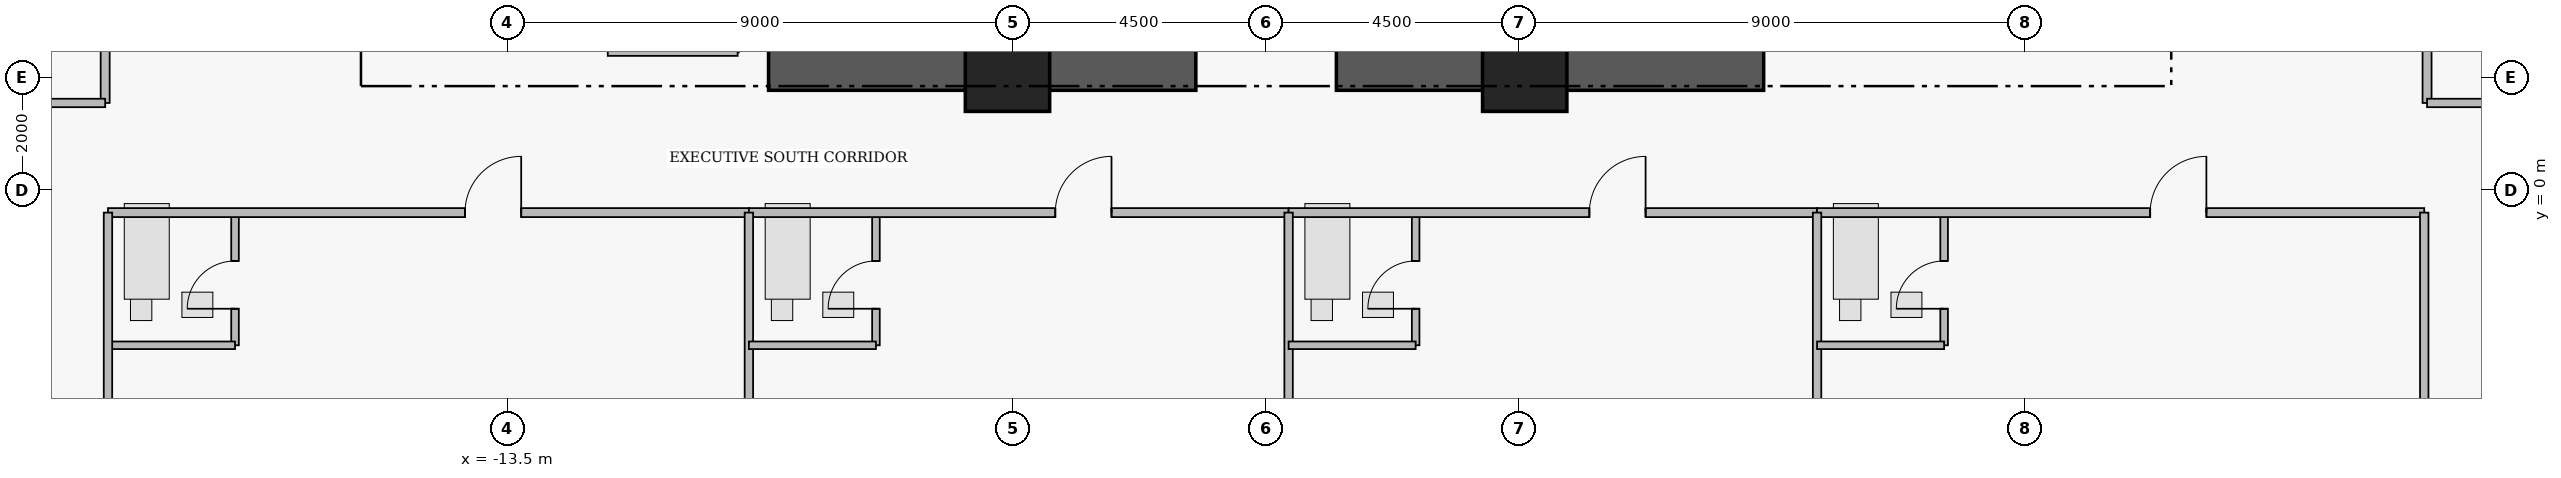
"""IFC4 building model, lengths in metres.
Left out: names, types, materials, properties, quantities, classifications, styles, units other than length and angle.
Written with IfcOpenShell. Run it as: python <this file> out.ifc"""

import sys

from ifc_helpers import new_model, si_unit, direction, frame, frame_2d, origin, origin_2d, place, context, subcontext, project, spatial, rectangle, extrude, element, fill, save


model = new_model("IFC4")
c1 = context("Model", 3, precision=1e-05, world=origin(), true_north=direction((0.0, 1.0)))
c2 = subcontext(c1, "Body", "Model", "MODEL_VIEW")
j1 = project(units=[si_unit("LENGTHUNIT", "METRE"), si_unit("PLANEANGLEUNIT", "RADIAN")], contexts=[c1])
p1 = place(None, origin())
s1 = spatial("IfcSite", under=j1, at=p1, CompositionType="ELEMENT")
p2 = place(p1, origin())
s2 = spatial("IfcBuilding", under=s1, at=p2, CompositionType="ELEMENT")
p3 = place(p2, frame((0.0, 0.0, 117.55)))
s3 = spatial("IfcBuildingStorey", under=s2, at=p3, CompositionType="ELEMENT", Elevation=117.55)
for number, where, z_axis, x_axis in (
    (1, (-8.85, 2.15, 0.0), (0.0, 0.0, 1.0), (1.0, 0.0, 0.0)),
    (2, (1.25, 2.15, 0.0), (0.0, 0.0, 1.0), (1.0, 0.0, 0.0)),
):
    element("IfcWall", number, at=place(p3, frame(where, z_axis=z_axis, x_axis=x_axis)), inside=s3, PredefinedType="SHEAR", context=c2, shape_type="SweptSolid", body=[
        extrude(rectangle(XDim=7.6, YDim=0.75, at=frame_2d((3.8, 0.0))), origin(), (0.0, 0.0, 1.0), 3.43),
    ])
for number, where, z_axis, x_axis in (
    (3, (-4.6, 2.15, 0.0), (0.0, 0.0, 1.0), (1.0, 0.0, 0.0)),
    (4, (4.6, 2.15, 0.0), (0.0, 0.0, 1.0), (1.0, 0.0, 0.0)),
):
    element("IfcColumn", number, at=place(p3, frame(where, z_axis=z_axis, x_axis=x_axis)), inside=s3, PredefinedType="COLUMN", context=c2, shape_type="SweptSolid", body=[
        extrude(rectangle(XDim=1.5, YDim=1.5, at=origin_2d()), origin(), (0.0, 0.0, 1.0), 3.65),
    ])
p4 = place(p3, frame((-18.34, -2.76, 0.0), z_axis=(0.0, 0.0, 1.0), x_axis=(0.0, 1.0, 0.0)))
e5 = element("IfcWall", 5, at=p4, inside=s3, PredefinedType="PLUMBINGWALL", context=c2, shape_type="SweptSolid", body=[
    extrude(rectangle(XDim=2.36, YDim=0.135, at=frame_2d((1.18, 0.0))), origin(), (0.0, 0.0, 1.0), 3.43),
])
p5 = place(p4, frame((0.65, 0.0, 0.0)))
e6 = element("IfcOpeningElement", 6, at=p5, cuts=e5, PredefinedType="OPENING", context=c2, shape_type="SweptSolid", body=[
    extrude(rectangle(XDim=0.85, YDim=2.1, at=frame_2d((0.425, 1.05))), frame((0.0, 0.077, 0.0), z_axis=(0.0, -1.0, 0.0), x_axis=(1.0, 0.0, 0.0)), (0.0, 0.0, 1.0), 0.155),
])
p6 = place(p3, frame((-20.6, -0.4, 0.0), z_axis=(0.0, 0.0, 1.0), x_axis=(1.0, 0.0, 0.0)))
e7 = element("IfcWall", 7, at=p6, inside=s3, PredefinedType="PARTITIONING", context=c2, shape_type="SweptSolid", body=[
    extrude(rectangle(XDim=11.4, YDim=0.16, at=frame_2d((5.7, 0.0))), origin(), (0.0, 0.0, 1.0), 3.43),
])
p7 = place(p6, frame((6.35, 0.0, 0.0)))
e8 = element("IfcOpeningElement", 8, at=p7, cuts=e7, PredefinedType="OPENING", context=c2, shape_type="SweptSolid", body=[
    extrude(rectangle(XDim=1.0, YDim=2.15, at=frame_2d((0.5, 1.075))), frame((0.0, 0.09, 0.0), z_axis=(0.0, -1.0, 0.0), x_axis=(1.0, 0.0, 0.0)), (0.0, 0.0, 1.0), 0.18),
])
p8 = place(p3, frame((-6.94, -2.76, 0.0), z_axis=(0.0, 0.0, 1.0), x_axis=(0.0, 1.0, 0.0)))
e9 = element("IfcWall", 9, at=p8, inside=s3, PredefinedType="PLUMBINGWALL", context=c2, shape_type="SweptSolid", body=[
    extrude(rectangle(XDim=2.36, YDim=0.135, at=frame_2d((1.18, 0.0))), origin(), (0.0, 0.0, 1.0), 3.43),
])
p9 = place(p8, frame((0.65, 0.0, 0.0)))
e10 = element("IfcOpeningElement", 10, at=p9, cuts=e9, PredefinedType="OPENING", context=c2, shape_type="SweptSolid", body=[
    extrude(rectangle(XDim=0.85, YDim=2.1, at=frame_2d((0.425, 1.05))), frame((0.0, 0.077, 0.0), z_axis=(0.0, -1.0, 0.0), x_axis=(1.0, 0.0, 0.0)), (0.0, 0.0, 1.0), 0.155),
])
p10 = place(p3, frame((-9.2, -0.4, 0.0), z_axis=(0.0, 0.0, 1.0), x_axis=(1.0, 0.0, 0.0)))
e11 = element("IfcWall", 11, at=p10, inside=s3, PredefinedType="PARTITIONING", context=c2, shape_type="SweptSolid", body=[
    extrude(rectangle(XDim=9.6, YDim=0.16, at=frame_2d((4.8, 0.0))), origin(), (0.0, 0.0, 1.0), 3.43),
])
p11 = place(p10, frame((5.45, 0.0, 0.0)))
e12 = element("IfcOpeningElement", 12, at=p11, cuts=e11, PredefinedType="OPENING", context=c2, shape_type="SweptSolid", body=[
    extrude(rectangle(XDim=1.0, YDim=2.15, at=frame_2d((0.5, 1.075))), frame((0.0, 0.09, 0.0), z_axis=(0.0, -1.0, 0.0), x_axis=(1.0, 0.0, 0.0)), (0.0, 0.0, 1.0), 0.18),
])
p12 = place(p3, frame((2.66, -2.76, 0.0), z_axis=(0.0, 0.0, 1.0), x_axis=(0.0, 1.0, 0.0)))
e13 = element("IfcWall", 13, at=p12, inside=s3, PredefinedType="PLUMBINGWALL", context=c2, shape_type="SweptSolid", body=[
    extrude(rectangle(XDim=2.36, YDim=0.135, at=frame_2d((1.18, 0.0))), origin(), (0.0, 0.0, 1.0), 3.43),
])
p13 = place(p12, frame((0.65, 0.0, 0.0)))
e14 = element("IfcOpeningElement", 14, at=p13, cuts=e13, PredefinedType="OPENING", context=c2, shape_type="SweptSolid", body=[
    extrude(rectangle(XDim=0.85, YDim=2.1, at=frame_2d((0.425, 1.05))), frame((0.0, 0.077, 0.0), z_axis=(0.0, -1.0, 0.0), x_axis=(1.0, 0.0, 0.0)), (0.0, 0.0, 1.0), 0.155),
])
p14 = place(p3, frame((0.4, -0.4, 0.0), z_axis=(0.0, 0.0, 1.0), x_axis=(1.0, 0.0, 0.0)))
e15 = element("IfcWall", 15, at=p14, inside=s3, PredefinedType="PARTITIONING", context=c2, shape_type="SweptSolid", body=[
    extrude(rectangle(XDim=9.4, YDim=0.16, at=frame_2d((4.7, 0.0))), origin(), (0.0, 0.0, 1.0), 3.43),
])
p15 = place(p14, frame((5.35, 0.0, 0.0)))
e16 = element("IfcOpeningElement", 16, at=p15, cuts=e15, PredefinedType="OPENING", context=c2, shape_type="SweptSolid", body=[
    extrude(rectangle(XDim=1.0, YDim=2.15, at=frame_2d((0.5, 1.075))), frame((0.0, 0.09, 0.0), z_axis=(0.0, -1.0, 0.0), x_axis=(1.0, 0.0, 0.0)), (0.0, 0.0, 1.0), 0.18),
])
p16 = place(p3, frame((12.06, -2.76, 0.0), z_axis=(0.0, 0.0, 1.0), x_axis=(0.0, 1.0, 0.0)))
e17 = element("IfcWall", 17, at=p16, inside=s3, PredefinedType="PLUMBINGWALL", context=c2, shape_type="SweptSolid", body=[
    extrude(rectangle(XDim=2.36, YDim=0.135, at=frame_2d((1.18, 0.0))), origin(), (0.0, 0.0, 1.0), 3.43),
])
p17 = place(p16, frame((0.65, 0.0, 0.0)))
e18 = element("IfcOpeningElement", 18, at=p17, cuts=e17, PredefinedType="OPENING", context=c2, shape_type="SweptSolid", body=[
    extrude(rectangle(XDim=0.85, YDim=2.1, at=frame_2d((0.425, 1.05))), frame((0.0, 0.077, 0.0), z_axis=(0.0, -1.0, 0.0), x_axis=(1.0, 0.0, 0.0)), (0.0, 0.0, 1.0), 0.155),
])
p18 = place(p3, frame((9.8, -0.4, 0.0), z_axis=(0.0, 0.0, 1.0), x_axis=(1.0, 0.0, 0.0)))
e19 = element("IfcWall", 19, at=p18, inside=s3, PredefinedType="PARTITIONING", context=c2, shape_type="SweptSolid", body=[
    extrude(rectangle(XDim=10.8, YDim=0.16, at=frame_2d((5.4, 0.0))), origin(), (0.0, 0.0, 1.0), 3.43),
])
p19 = place(p18, frame((5.925, 0.0, 0.0)))
e20 = element("IfcOpeningElement", 20, at=p19, cuts=e19, PredefinedType="OPENING", context=c2, shape_type="SweptSolid", body=[
    extrude(rectangle(XDim=1.0, YDim=2.15, at=frame_2d((0.5, 1.075))), frame((0.0, 0.09, 0.0), z_axis=(0.0, -1.0, 0.0), x_axis=(1.0, 0.0, 0.0)), (0.0, 0.0, 1.0), 0.18),
])
p20 = place(p3, frame((20.65, 1.55, 0.0), z_axis=(0.0, 0.0, 1.0), x_axis=(0.0, 1.0, 0.0)))
e21 = element("IfcWall", 21, at=p20, inside=s3, PredefinedType="PARTITIONING", context=c2, shape_type="SweptSolid", body=[
    extrude(rectangle(XDim=5.2, YDim=0.16, at=frame_2d((2.6, 0.0))), origin(), (0.0, 0.0, 1.0), 3.43),
])
p21 = place(p20, frame((2.14, 0.0, 0.0)))
e22 = element("IfcOpeningElement", 22, at=p21, cuts=e21, PredefinedType="OPENING", context=c2, shape_type="SweptSolid", body=[
    extrude(rectangle(XDim=0.92, YDim=2.12, at=frame_2d((0.46, 1.06))), frame((0.0, 0.09, 0.0), z_axis=(0.0, -1.0, 0.0), x_axis=(1.0, 0.0, 0.0)), (0.0, 0.0, 1.0), 0.18),
])
p22 = place(p3, frame((-20.65, 1.55, 0.0), z_axis=(0.0, 0.0, 1.0), x_axis=(0.0, 1.0, 0.0)))
e23 = element("IfcWall", 23, at=p22, inside=s3, PredefinedType="PARTITIONING", context=c2, shape_type="SweptSolid", body=[
    extrude(rectangle(XDim=13.3, YDim=0.16, at=frame_2d((6.65, 0.0))), origin(), (0.0, 0.0, 1.0), 3.43),
])
p23 = place(p22, frame((6.175, 0.0, 0.0)))
e24 = element("IfcOpeningElement", 24, at=p23, cuts=e23, PredefinedType="OPENING", context=c2, shape_type="SweptSolid", body=[
    extrude(rectangle(XDim=0.95, YDim=2.15, at=frame_2d((0.475, 1.075))), frame((0.0, 0.09, 0.0), z_axis=(0.0, -1.0, 0.0), x_axis=(1.0, 0.0, 0.0)), (0.0, 0.0, 1.0), 0.18),
])
p24 = place(p3, frame((-11.71, 2.47, 0.0), z_axis=(0.0, 0.0, 1.0), x_axis=(1.0, 0.0, 0.0)))
e25 = element("IfcWall", 25, at=p24, inside=s3, PredefinedType="PARTITIONING", context=c2, shape_type="SweptSolid", body=[
    extrude(rectangle(XDim=2.31, YDim=0.165, at=frame_2d((1.155, 0.0))), origin(), (0.0, 0.0, 1.0), 2.03),
])
p25 = place(p3, frame((-20.6, -2.76, 0.0), z_axis=(0.0, 0.0, 1.0), x_axis=(1.0, 0.0, 0.0)))
e26 = element("IfcWall", 26, at=p25, inside=s3, PredefinedType="PLUMBINGWALL", context=c2, shape_type="SweptSolid", body=[
    extrude(rectangle(XDim=2.26, YDim=0.135, at=frame_2d((1.13, 0.0))), origin(), (0.0, 0.0, 1.0), 3.43),
])
p26 = place(p3, frame((-20.6, -11.9, 0.0), z_axis=(0.0, 0.0, 1.0), x_axis=(0.0, 1.0, 0.0)))
e27 = element("IfcWall", 27, at=p26, inside=s3, PredefinedType="PARTITIONING", context=c2, shape_type="SweptSolid", body=[
    extrude(rectangle(XDim=11.5, YDim=0.15, at=frame_2d((5.75, 0.0))), origin(), (0.0, 0.0, 1.0), 3.43),
])
p27 = place(p3, frame((-9.2, -15.32, 0.0), z_axis=(0.0, 0.0, 1.0), x_axis=(0.0, 1.0, 0.0)))
e28 = element("IfcWall", 28, at=p27, inside=s3, PredefinedType="PARTITIONING", context=c2, shape_type="SweptSolid", body=[
    extrude(rectangle(XDim=14.92, YDim=0.15, at=frame_2d((7.46, 0.0))), origin(), (0.0, 0.0, 1.0), 3.43),
])
p28 = place(p3, frame((-9.2, -2.76, 0.0), z_axis=(0.0, 0.0, 1.0), x_axis=(1.0, 0.0, 0.0)))
e29 = element("IfcWall", 29, at=p28, inside=s3, PredefinedType="PLUMBINGWALL", context=c2, shape_type="SweptSolid", body=[
    extrude(rectangle(XDim=2.26, YDim=0.135, at=frame_2d((1.13, 0.0))), origin(), (0.0, 0.0, 1.0), 3.43),
])
p29 = place(p3, frame((0.4, -15.32, 0.0), z_axis=(0.0, 0.0, 1.0), x_axis=(0.0, 1.0, 0.0)))
e30 = element("IfcWall", 30, at=p29, inside=s3, PredefinedType="PARTITIONING", context=c2, shape_type="SweptSolid", body=[
    extrude(rectangle(XDim=14.92, YDim=0.15, at=frame_2d((7.46, 0.0))), origin(), (0.0, 0.0, 1.0), 3.43),
])
p30 = place(p3, frame((0.4, -2.76, 0.0), z_axis=(0.0, 0.0, 1.0), x_axis=(1.0, 0.0, 0.0)))
e31 = element("IfcWall", 31, at=p30, inside=s3, PredefinedType="PLUMBINGWALL", context=c2, shape_type="SweptSolid", body=[
    extrude(rectangle(XDim=2.26, YDim=0.135, at=frame_2d((1.13, 0.0))), origin(), (0.0, 0.0, 1.0), 3.43),
])
p31 = place(p3, frame((9.8, -15.32, 0.0), z_axis=(0.0, 0.0, 1.0), x_axis=(0.0, 1.0, 0.0)))
e32 = element("IfcWall", 32, at=p31, inside=s3, PredefinedType="PARTITIONING", context=c2, shape_type="SweptSolid", body=[
    extrude(rectangle(XDim=14.92, YDim=0.15, at=frame_2d((7.46, 0.0))), origin(), (0.0, 0.0, 1.0), 3.43),
])
p32 = place(p3, frame((9.8, -2.76, 0.0), z_axis=(0.0, 0.0, 1.0), x_axis=(1.0, 0.0, 0.0)))
e33 = element("IfcWall", 33, at=p32, inside=s3, PredefinedType="PLUMBINGWALL", context=c2, shape_type="SweptSolid", body=[
    extrude(rectangle(XDim=2.26, YDim=0.135, at=frame_2d((1.13, 0.0))), origin(), (0.0, 0.0, 1.0), 3.43),
])
p33 = place(p3, frame((20.6, -11.9, 0.0), z_axis=(0.0, 0.0, 1.0), x_axis=(0.0, 1.0, 0.0)))
e34 = element("IfcWall", 34, at=p33, inside=s3, PredefinedType="PARTITIONING", context=c2, shape_type="SweptSolid", body=[
    extrude(rectangle(XDim=11.5, YDim=0.15, at=frame_2d((5.75, 0.0))), origin(), (0.0, 0.0, 1.0), 3.43),
])
for number, where, z_axis, x_axis in (
    (35, (20.65, 1.55, 0.0), (0.0, 0.0, 1.0), (1.0, 0.0, 0.0)),
    (36, (-23.867, 1.55, 0.0), (0.0, 0.0, 1.0), (1.0, 0.0, 0.0)),
):
    element("IfcWall", number, at=place(p3, frame(where, z_axis=z_axis, x_axis=x_axis)), inside=s3, PredefinedType="PARTITIONING", context=c2, shape_type="SweptSolid", body=[
        extrude(rectangle(XDim=3.217, YDim=0.15, at=frame_2d((1.608, 0.0))), origin(), (0.0, 0.0, 1.0), 3.43),
    ])
p34 = place(p5, origin())
e37 = element("IfcDoor", 37, at=p34, inside=s3, OperationType="SINGLE_SWING_LEFT", PredefinedType="DOOR", context=c2, shape_type="SweptSolid", body=[
    extrude(rectangle(XDim=0.85, YDim=2.1, at=frame_2d((0.425, 1.05))), frame((0.0, 0.025, 0.0), z_axis=(0.0, -1.0, 0.0), x_axis=(1.0, 0.0, 0.0)), (0.0, 0.0, 1.0), 0.05),
])
fill(e6, e37)
p35 = place(p7, origin())
e38 = element("IfcDoor", 38, at=p35, inside=s3, OperationType="SINGLE_SWING_RIGHT", PredefinedType="DOOR", context=c2, shape_type="SweptSolid", body=[
    extrude(rectangle(XDim=1.0, YDim=2.15, at=frame_2d((0.5, 1.075))), frame((0.0, 0.025, 0.0), z_axis=(0.0, -1.0, 0.0), x_axis=(1.0, 0.0, 0.0)), (0.0, 0.0, 1.0), 0.05),
])
fill(e8, e38)
p36 = place(p9, origin())
e39 = element("IfcDoor", 39, at=p36, inside=s3, OperationType="SINGLE_SWING_LEFT", PredefinedType="DOOR", context=c2, shape_type="SweptSolid", body=[
    extrude(rectangle(XDim=0.85, YDim=2.1, at=frame_2d((0.425, 1.05))), frame((0.0, 0.025, 0.0), z_axis=(0.0, -1.0, 0.0), x_axis=(1.0, 0.0, 0.0)), (0.0, 0.0, 1.0), 0.05),
])
fill(e10, e39)
p37 = place(p11, origin())
e40 = element("IfcDoor", 40, at=p37, inside=s3, OperationType="SINGLE_SWING_RIGHT", PredefinedType="DOOR", context=c2, shape_type="SweptSolid", body=[
    extrude(rectangle(XDim=1.0, YDim=2.15, at=frame_2d((0.5, 1.075))), frame((0.0, 0.025, 0.0), z_axis=(0.0, -1.0, 0.0), x_axis=(1.0, 0.0, 0.0)), (0.0, 0.0, 1.0), 0.05),
])
fill(e12, e40)
p38 = place(p13, origin())
e41 = element("IfcDoor", 41, at=p38, inside=s3, OperationType="SINGLE_SWING_LEFT", PredefinedType="DOOR", context=c2, shape_type="SweptSolid", body=[
    extrude(rectangle(XDim=0.85, YDim=2.1, at=frame_2d((0.425, 1.05))), frame((0.0, 0.025, 0.0), z_axis=(0.0, -1.0, 0.0), x_axis=(1.0, 0.0, 0.0)), (0.0, 0.0, 1.0), 0.05),
])
fill(e14, e41)
p39 = place(p15, origin())
e42 = element("IfcDoor", 42, at=p39, inside=s3, OperationType="SINGLE_SWING_RIGHT", PredefinedType="DOOR", context=c2, shape_type="SweptSolid", body=[
    extrude(rectangle(XDim=1.0, YDim=2.15, at=frame_2d((0.5, 1.075))), frame((0.0, 0.025, 0.0), z_axis=(0.0, -1.0, 0.0), x_axis=(1.0, 0.0, 0.0)), (0.0, 0.0, 1.0), 0.05),
])
fill(e16, e42)
p40 = place(p17, origin())
e43 = element("IfcDoor", 43, at=p40, inside=s3, OperationType="SINGLE_SWING_LEFT", PredefinedType="DOOR", context=c2, shape_type="SweptSolid", body=[
    extrude(rectangle(XDim=0.85, YDim=2.1, at=frame_2d((0.425, 1.05))), frame((0.0, 0.025, 0.0), z_axis=(0.0, -1.0, 0.0), x_axis=(1.0, 0.0, 0.0)), (0.0, 0.0, 1.0), 0.05),
])
fill(e18, e43)
p41 = place(p19, origin())
e44 = element("IfcDoor", 44, at=p41, inside=s3, OperationType="SINGLE_SWING_RIGHT", PredefinedType="DOOR", context=c2, shape_type="SweptSolid", body=[
    extrude(rectangle(XDim=1.0, YDim=2.15, at=frame_2d((0.5, 1.075))), frame((0.0, 0.025, 0.0), z_axis=(0.0, -1.0, 0.0), x_axis=(1.0, 0.0, 0.0)), (0.0, 0.0, 1.0), 0.05),
])
fill(e20, e44)
save(model, sys.argv[1])
